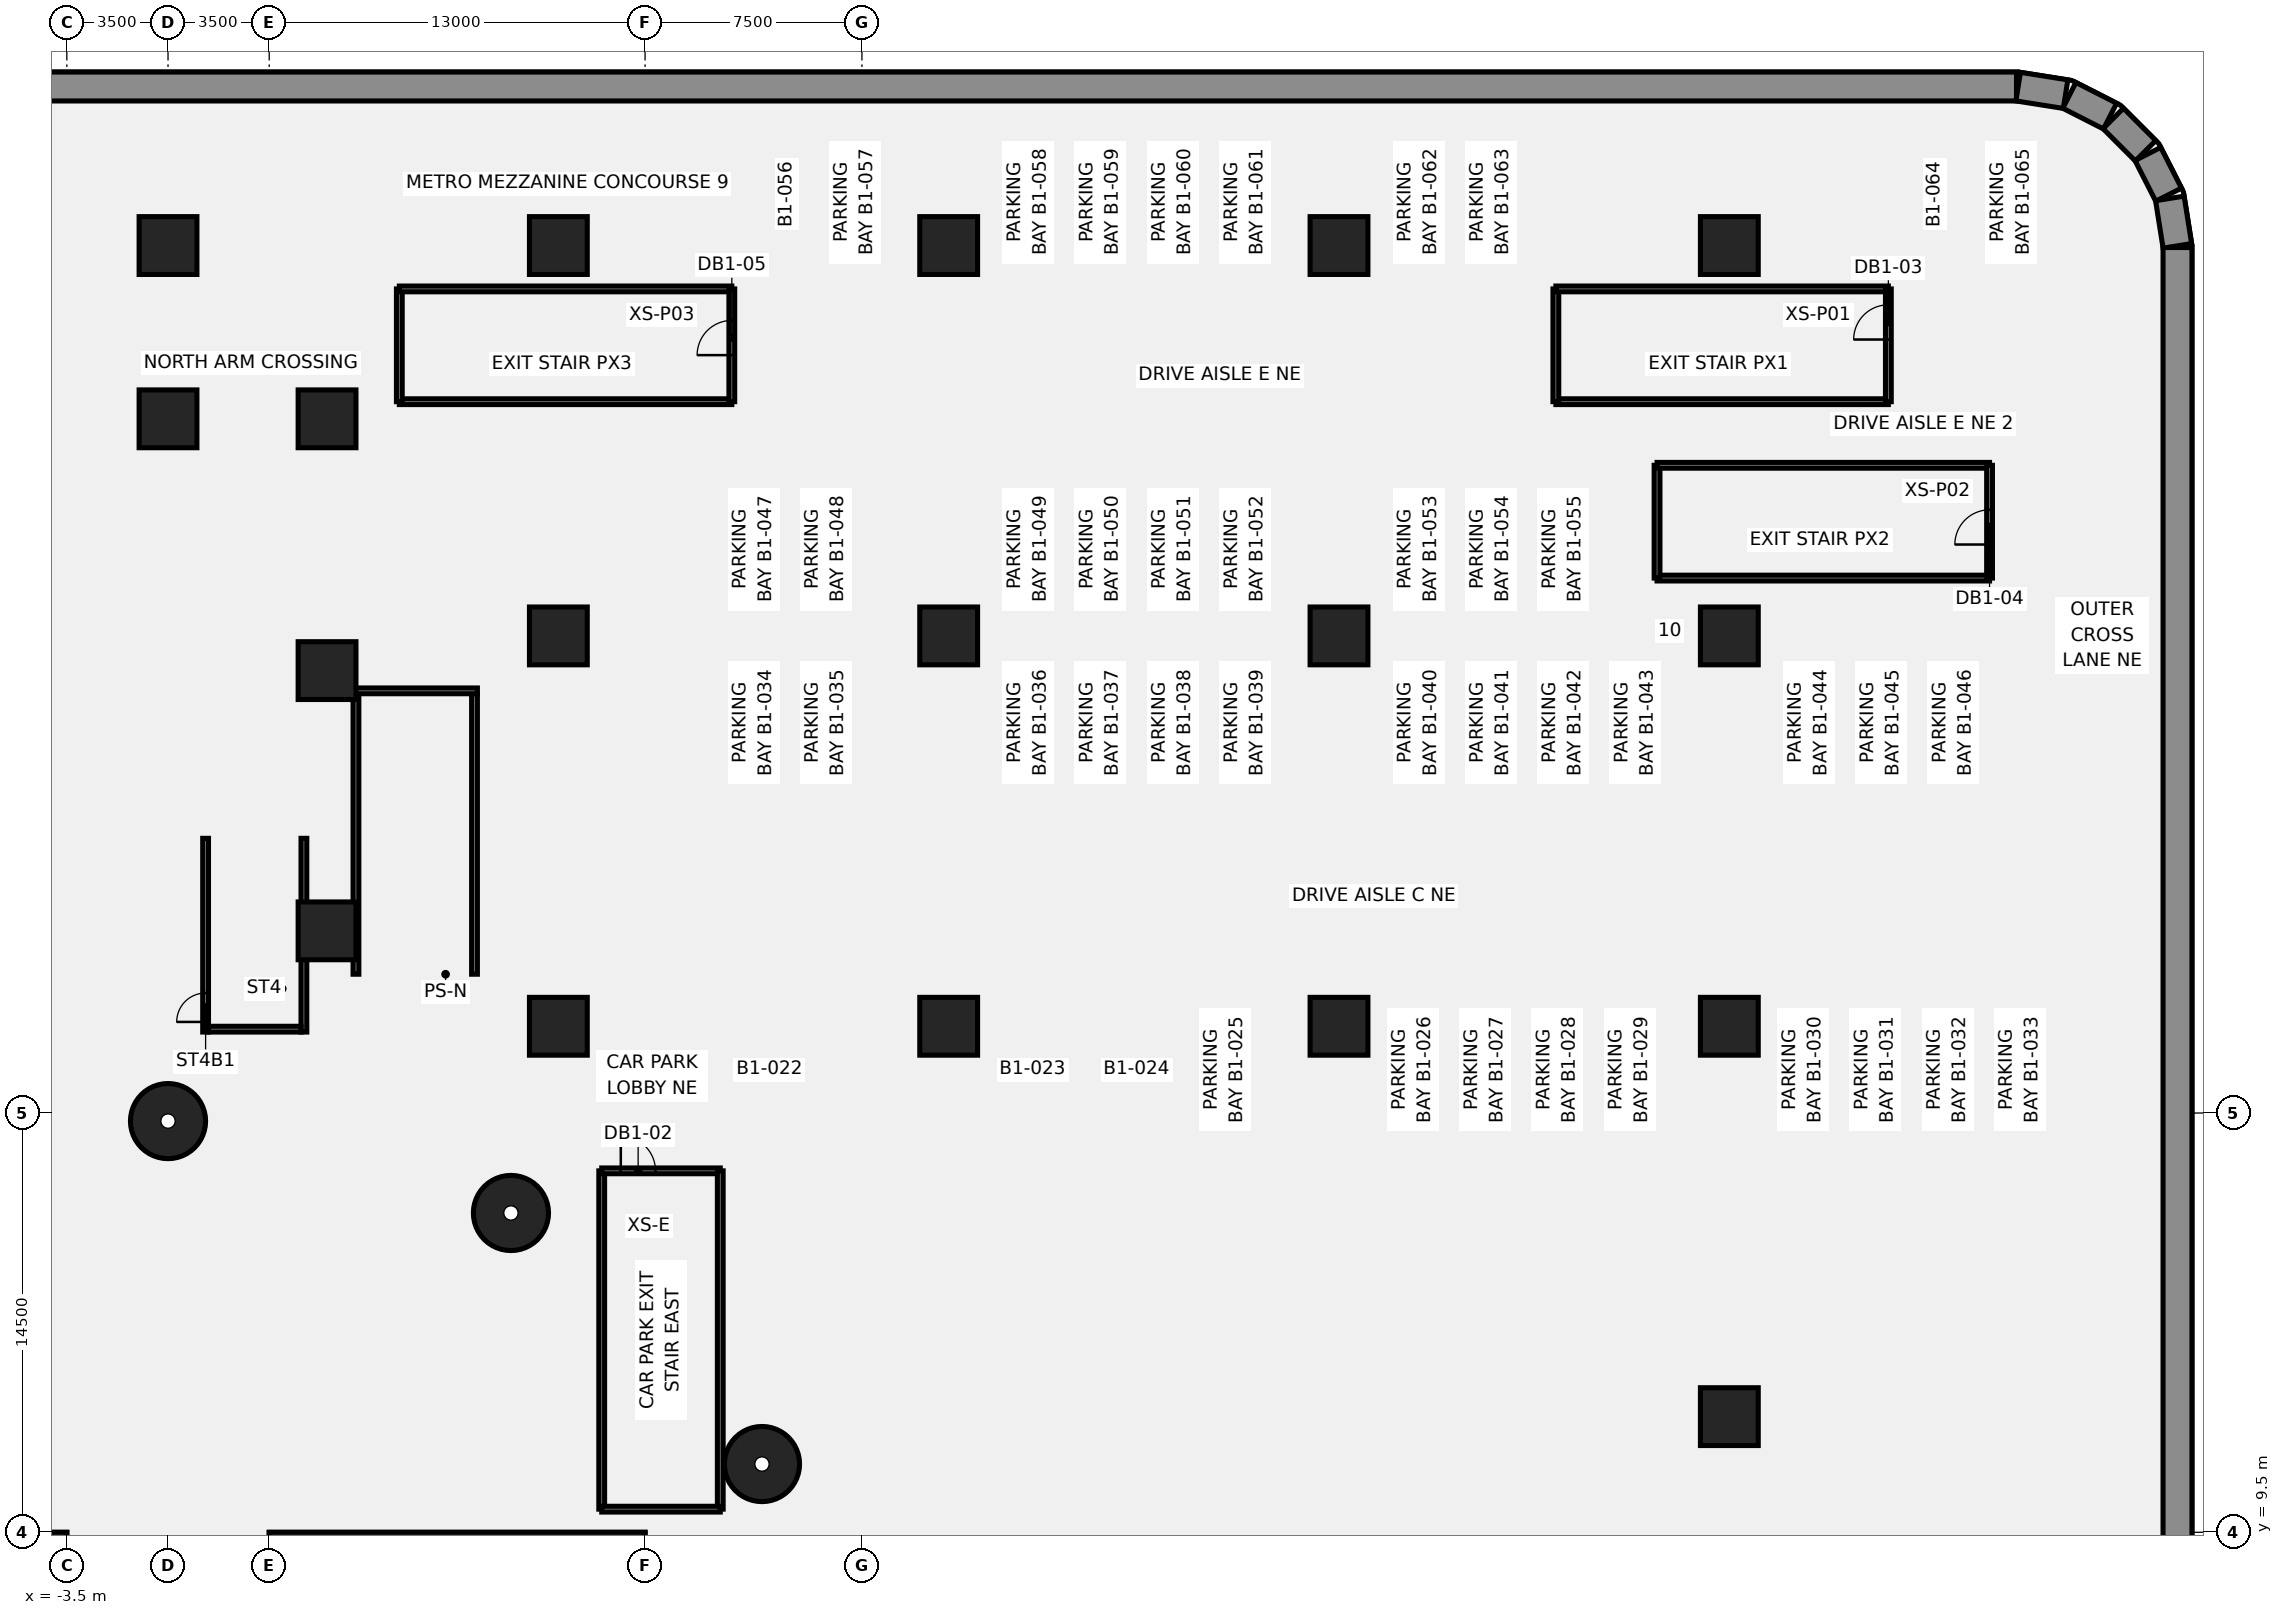
"""IFC4 building model, lengths in metres.
Left out: names, types, materials, properties, quantities, classifications, styles, units other than length and angle.
Written with IfcOpenShell. Run it as: python <this file> out.ifc"""

import sys

from ifc_helpers import new_model, si_unit, direction, frame, frame_2d, origin, origin_2d, place, context, subcontext, project, spatial, polyline, rectangle, circle, outline, extrude, element, fill, save


model = new_model("IFC4")
c1 = context("Model", 3, precision=1e-05, world=origin(), true_north=direction((0.0, 1.0)))
c2 = subcontext(c1, "Body", "Model", "MODEL_VIEW")
j1 = project(units=[si_unit("LENGTHUNIT", "METRE"), si_unit("PLANEANGLEUNIT", "RADIAN")], contexts=[c1])
p1 = place(None, origin())
s1 = spatial("IfcSite", under=j1, at=p1, CompositionType="ELEMENT")
p2 = place(p1, origin())
s2 = spatial("IfcBuilding", under=s1, at=p2, CompositionType="ELEMENT")
p3 = place(p2, frame((0.0, 0.0, -7.0)))
s3 = spatial("IfcBuildingStorey", under=s2, at=p3, CompositionType="ELEMENT", Elevation=-7.0)
p4 = place(p3, frame((-63.931, 59.5, -0.45), z_axis=(0.0, 0.0, 1.0), x_axis=(1.0, 0.0, 0.0)))
e1 = element("IfcWall", 1, at=p4, inside=s3, PredefinedType="SOLIDWALL", context=c2, shape_type="SweptSolid", body=[
    extrude(rectangle(XDim=127.863, YDim=1.0, at=frame_2d((63.931, 0.0))), origin(), (0.0, 0.0, 1.0), 6.9),
])
p5 = place(p3, frame((63.99, 59.495, -0.45), z_axis=(0.0, 0.0, 1.0), x_axis=(0.987688946427, -0.156430639922, 0.0)))
e2 = element("IfcWall", 2, at=p5, inside=s3, PredefinedType="SOLIDWALL", context=c2, shape_type="SweptSolid", body=[
    extrude(rectangle(XDim=1.661, YDim=1.0, at=frame_2d((0.83, 0.0))), origin(), (0.0, 0.0, 1.0), 6.9),
])
for number, where, z_axis, x_axis in (
    (3, (65.759, 59.194, -0.45), (0.0, 0.0, 1.0), (0.891, -0.454, 0.0)),
    (4, (67.278, 58.396, -0.45), (0.0, 0.0, 1.0), (0.707, -0.707, 0.0)),
    (5, (68.476, 57.168, -0.45), (0.0, 0.0, 1.0), (0.454, -0.891, 0.0)),
):
    element("IfcWall", number, at=place(p3, frame(where, z_axis=z_axis, x_axis=x_axis)), inside=s3, PredefinedType="SOLIDWALL", context=c2, shape_type="SweptSolid", body=[
        extrude(rectangle(XDim=1.581, YDim=1.0, at=frame_2d((0.791, 0.0))), origin(), (0.0, 0.0, 1.0), 6.9),
    ])
p6 = place(p3, frame((69.236, 55.63, -0.45), z_axis=(0.0, 0.0, 1.0), x_axis=(0.156430639922, -0.987688946427, 0.0)))
e6 = element("IfcWall", 6, at=p6, inside=s3, PredefinedType="SOLIDWALL", context=c2, shape_type="SweptSolid", body=[
    extrude(rectangle(XDim=1.661, YDim=1.0, at=frame_2d((0.83, 0.0))), origin(), (0.0, 0.0, 1.0), 6.9),
])
p7 = place(p3, frame((69.5, 53.931, -0.45), z_axis=(0.0, 0.0, 1.0), x_axis=(0.0, -1.0, 0.0)))
e7 = element("IfcWall", 7, at=p7, inside=s3, PredefinedType="SOLIDWALL", context=c2, shape_type="SweptSolid", body=[
    extrude(rectangle(XDim=107.863, YDim=1.0, at=frame_2d((53.931, 0.0))), origin(), (0.0, 0.0, 1.0), 6.9),
])
for number, where, z_axis, x_axis in (
    (8, (20.543, 11.86, -0.45), (0.0, 0.0, 1.0), (1.0, 0.0, 0.0)),
    (9, (11.86, 20.543, -0.45), (0.0, 0.0, 1.0), (1.0, 0.0, 0.0)),
    (10, (0.0, 23.721, -0.45), (0.0, 0.0, 1.0), (1.0, 0.0, 0.0)),
):
    element("IfcColumn", number, at=place(p3, frame(where, z_axis=z_axis, x_axis=x_axis)), inside=s3, PredefinedType="COLUMN", context=c2, shape_type="SweptSolid", body=[
        extrude(circle(Radius=1.3, at=origin_2d()), origin(), (0.0, 0.0, 1.0), 6.9),
    ])
for number, where, z_axis, x_axis in (
    (11, (5.5, 39.3, -0.45), (0.0, 0.0, 1.0), (1.0, 0.0, 0.0)),
    (12, (5.5, 30.3, -0.45), (0.0, 0.0, 1.0), (1.0, 0.0, 0.0)),
    (13, (5.5, 48.008, -0.45), (0.0, 0.0, 1.0), (1.0, 0.0, 0.0)),
    (14, (0.0, 48.008, -0.45), (0.0, 0.0, 1.0), (1.0, 0.0, 0.0)),
    (15, (0.0, 54.0, -0.45), (0.0, 0.0, 1.0), (1.0, 0.0, 0.0)),
    (16, (13.5, 27.0, -0.45), (0.0, 0.0, 1.0), (1.0, 0.0, 0.0)),
    (17, (13.5, 40.5, -0.45), (0.0, 0.0, 1.0), (1.0, 0.0, 0.0)),
    (18, (13.5, 54.0, -0.45), (0.0, 0.0, 1.0), (1.0, 0.0, 0.0)),
    (19, (27.0, 27.0, -0.45), (0.0, 0.0, 1.0), (1.0, 0.0, 0.0)),
    (20, (27.0, 40.5, -0.45), (0.0, 0.0, 1.0), (1.0, 0.0, 0.0)),
    (21, (27.0, 54.0, -0.45), (0.0, 0.0, 1.0), (1.0, 0.0, 0.0)),
    (22, (40.5, 27.0, -0.45), (0.0, 0.0, 1.0), (1.0, 0.0, 0.0)),
    (23, (40.5, 40.5, -0.45), (0.0, 0.0, 1.0), (1.0, 0.0, 0.0)),
    (24, (40.5, 54.0, -0.45), (0.0, 0.0, 1.0), (1.0, 0.0, 0.0)),
    (25, (54.0, 13.5, -0.45), (0.0, 0.0, 1.0), (1.0, 0.0, 0.0)),
    (26, (54.0, 27.0, -0.45), (0.0, 0.0, 1.0), (1.0, 0.0, 0.0)),
    (27, (54.0, 40.5, -0.45), (0.0, 0.0, 1.0), (1.0, 0.0, 0.0)),
    (28, (54.0, 54.0, -0.45), (0.0, 0.0, 1.0), (1.0, 0.0, 0.0)),
):
    element("IfcColumn", number, at=place(p3, frame(where, z_axis=z_axis, x_axis=x_axis)), inside=s3, PredefinedType="COLUMN", context=c2, shape_type="SweptSolid", body=[
        extrude(rectangle(XDim=2.0, YDim=2.0, at=origin_2d()), origin(), (0.0, 0.0, 1.0), 6.9),
    ])
p8 = place(p3, frame((15.0, 10.3, 0.0), z_axis=(0.0, 0.0, 1.0), x_axis=(0.0, 1.0, 0.0)))
e29 = element("IfcWall", 29, at=p8, inside=s3, PredefinedType="PARTITIONING", context=c2, shape_type="SweptSolid", body=[
    extrude(rectangle(XDim=11.7, YDim=0.2, at=frame_2d((5.85, 0.0))), origin(), (0.0, 0.0, 1.0), 6.45),
])
p9 = place(p3, frame((15.0, 22.0, 0.0), z_axis=(0.0, 0.0, 1.0), x_axis=(1.0, 0.0, 0.0)))
e30 = element("IfcWall", 30, at=p9, inside=s3, PredefinedType="PARTITIONING", context=c2, shape_type="SweptSolid", body=[
    extrude(rectangle(XDim=4.1, YDim=0.2, at=frame_2d((2.05, 0.0))), origin(), (0.0, 0.0, 1.0), 6.45),
])
p10 = place(p9, frame((0.66, 0.0, 0.0)))
e31 = element("IfcOpeningElement", 31, at=p10, cuts=e30, PredefinedType="OPENING", context=c2, shape_type="SweptSolid", body=[
    extrude(rectangle(XDim=1.2, YDim=2.1, at=frame_2d((0.6, 1.05))), frame((0.0, 0.11, 0.0), z_axis=(0.0, -1.0, 0.0), x_axis=(1.0, 0.0, 0.0)), (0.0, 0.0, 1.0), 0.22),
])
p11 = place(p3, frame((19.1, 10.3, 0.0), z_axis=(0.0, 0.0, 1.0), x_axis=(0.0, 1.0, 0.0)))
e32 = element("IfcWall", 32, at=p11, inside=s3, PredefinedType="PARTITIONING", context=c2, shape_type="SweptSolid", body=[
    extrude(rectangle(XDim=11.7, YDim=0.2, at=frame_2d((5.85, 0.0))), origin(), (0.0, 0.0, 1.0), 6.45),
])
p12 = place(p3, frame((15.0, 10.3, 0.0), z_axis=(0.0, 0.0, 1.0), x_axis=(1.0, 0.0, 0.0)))
e33 = element("IfcWall", 33, at=p12, inside=s3, PredefinedType="PARTITIONING", context=c2, shape_type="SweptSolid", body=[
    extrude(rectangle(XDim=4.1, YDim=0.2, at=frame_2d((2.05, 0.0))), origin(), (0.0, 0.0, 1.0), 6.45),
])
p13 = place(p3, frame((8.0, 48.6, 0.0), z_axis=(0.0, 0.0, 1.0), x_axis=(1.0, 0.0, 0.0)))
e34 = element("IfcWall", 34, at=p13, inside=s3, PredefinedType="PARTITIONING", context=c2, shape_type="SweptSolid", body=[
    extrude(rectangle(XDim=11.5, YDim=0.2, at=frame_2d((5.75, 0.0))), origin(), (0.0, 0.0, 1.0), 6.45),
])
p14 = place(p3, frame((8.0, 48.6, 0.0), z_axis=(0.0, 0.0, 1.0), x_axis=(0.0, 1.0, 0.0)))
e35 = element("IfcWall", 35, at=p14, inside=s3, PredefinedType="PARTITIONING", context=c2, shape_type="SweptSolid", body=[
    extrude(rectangle(XDim=3.9, YDim=0.2, at=frame_2d((1.95, 0.0))), origin(), (0.0, 0.0, 1.0), 6.45),
])
p15 = place(p3, frame((8.0, 52.5, 0.0), z_axis=(0.0, 0.0, 1.0), x_axis=(1.0, 0.0, 0.0)))
e36 = element("IfcWall", 36, at=p15, inside=s3, PredefinedType="PARTITIONING", context=c2, shape_type="SweptSolid", body=[
    extrude(rectangle(XDim=11.5, YDim=0.2, at=frame_2d((5.75, 0.0))), origin(), (0.0, 0.0, 1.0), 6.45),
])
p16 = place(p3, frame((19.5, 48.6, 0.0), z_axis=(0.0, 0.0, 1.0), x_axis=(0.0, 1.0, 0.0)))
e37 = element("IfcWall", 37, at=p16, inside=s3, PredefinedType="PARTITIONING", context=c2, shape_type="SweptSolid", body=[
    extrude(rectangle(XDim=3.9, YDim=0.2, at=frame_2d((1.95, 0.0))), origin(), (0.0, 0.0, 1.0), 6.45),
])
p17 = place(p16, frame((1.61, 0.0, 0.0)))
e38 = element("IfcOpeningElement", 38, at=p17, cuts=e37, PredefinedType="OPENING", context=c2, shape_type="SweptSolid", body=[
    extrude(rectangle(XDim=1.2, YDim=2.1, at=frame_2d((0.6, 1.05))), frame((0.0, 0.11, 0.0), z_axis=(0.0, -1.0, 0.0), x_axis=(1.0, 0.0, 0.0)), (0.0, 0.0, 1.0), 0.22),
])
p18 = place(p3, frame((48.0, 48.6, 0.0), z_axis=(0.0, 0.0, 1.0), x_axis=(1.0, 0.0, 0.0)))
e39 = element("IfcWall", 39, at=p18, inside=s3, PredefinedType="PARTITIONING", context=c2, shape_type="SweptSolid", body=[
    extrude(rectangle(XDim=11.5, YDim=0.2, at=frame_2d((5.75, 0.0))), origin(), (0.0, 0.0, 1.0), 6.45),
])
p19 = place(p3, frame((48.0, 48.6, 0.0), z_axis=(0.0, 0.0, 1.0), x_axis=(0.0, 1.0, 0.0)))
e40 = element("IfcWall", 40, at=p19, inside=s3, PredefinedType="PARTITIONING", context=c2, shape_type="SweptSolid", body=[
    extrude(rectangle(XDim=3.9, YDim=0.2, at=frame_2d((1.95, 0.0))), origin(), (0.0, 0.0, 1.0), 6.45),
])
p20 = place(p3, frame((48.0, 52.5, 0.0), z_axis=(0.0, 0.0, 1.0), x_axis=(1.0, 0.0, 0.0)))
e41 = element("IfcWall", 41, at=p20, inside=s3, PredefinedType="PARTITIONING", context=c2, shape_type="SweptSolid", body=[
    extrude(rectangle(XDim=11.5, YDim=0.2, at=frame_2d((5.75, 0.0))), origin(), (0.0, 0.0, 1.0), 6.45),
])
p21 = place(p3, frame((59.5, 48.6, 0.0), z_axis=(0.0, 0.0, 1.0), x_axis=(0.0, 1.0, 0.0)))
e42 = element("IfcWall", 42, at=p21, inside=s3, PredefinedType="PARTITIONING", context=c2, shape_type="SweptSolid", body=[
    extrude(rectangle(XDim=3.9, YDim=0.2, at=frame_2d((1.95, 0.0))), origin(), (0.0, 0.0, 1.0), 6.45),
])
p22 = place(p21, frame((2.15, 0.0, 0.0)))
e43 = element("IfcOpeningElement", 43, at=p22, cuts=e42, PredefinedType="OPENING", context=c2, shape_type="SweptSolid", body=[
    extrude(rectangle(XDim=1.2, YDim=2.1, at=frame_2d((0.6, 1.05))), frame((0.0, 0.11, 0.0), z_axis=(0.0, -1.0, 0.0), x_axis=(1.0, 0.0, 0.0)), (0.0, 0.0, 1.0), 0.22),
])
p23 = place(p3, frame((51.5, 42.5, 0.0), z_axis=(0.0, 0.0, 1.0), x_axis=(1.0, 0.0, 0.0)))
e44 = element("IfcWall", 44, at=p23, inside=s3, PredefinedType="PARTITIONING", context=c2, shape_type="SweptSolid", body=[
    extrude(rectangle(XDim=11.5, YDim=0.2, at=frame_2d((5.75, 0.0))), origin(), (0.0, 0.0, 1.0), 6.45),
])
p24 = place(p3, frame((51.5, 42.5, 0.0), z_axis=(0.0, 0.0, 1.0), x_axis=(0.0, 1.0, 0.0)))
e45 = element("IfcWall", 45, at=p24, inside=s3, PredefinedType="PARTITIONING", context=c2, shape_type="SweptSolid", body=[
    extrude(rectangle(XDim=3.9, YDim=0.2, at=frame_2d((1.95, 0.0))), origin(), (0.0, 0.0, 1.0), 6.45),
])
p25 = place(p3, frame((51.5, 46.4, 0.0), z_axis=(0.0, 0.0, 1.0), x_axis=(1.0, 0.0, 0.0)))
e46 = element("IfcWall", 46, at=p25, inside=s3, PredefinedType="PARTITIONING", context=c2, shape_type="SweptSolid", body=[
    extrude(rectangle(XDim=11.5, YDim=0.2, at=frame_2d((5.75, 0.0))), origin(), (0.0, 0.0, 1.0), 6.45),
])
p26 = place(p3, frame((63.0, 42.5, 0.0), z_axis=(0.0, 0.0, 1.0), x_axis=(0.0, 1.0, 0.0)))
e47 = element("IfcWall", 47, at=p26, inside=s3, PredefinedType="PARTITIONING", context=c2, shape_type="SweptSolid", body=[
    extrude(rectangle(XDim=3.9, YDim=0.2, at=frame_2d((1.95, 0.0))), origin(), (0.0, 0.0, 1.0), 6.45),
])
p27 = place(p26, frame((1.16, 0.0, 0.0)))
e48 = element("IfcOpeningElement", 48, at=p27, cuts=e47, PredefinedType="OPENING", context=c2, shape_type="SweptSolid", body=[
    extrude(rectangle(XDim=1.2, YDim=2.1, at=frame_2d((0.6, 1.05))), frame((0.0, 0.11, 0.0), z_axis=(0.0, -1.0, 0.0), x_axis=(1.0, 0.0, 0.0)), (0.0, 0.0, 1.0), 0.22),
])
for number, where, z_axis, x_axis in (
    (49, (10.6, 28.8, 0.0), (0.0, 0.0, 1.0), (0.0, 1.0, 0.0)),
    (50, (6.5, 28.8, 0.0), (0.0, 0.0, 1.0), (0.0, 1.0, 0.0)),
):
    element("IfcWall", number, at=place(p3, frame(where, z_axis=z_axis, x_axis=x_axis)), inside=s3, PredefinedType="SOLIDWALL", context=c2, shape_type="SweptSolid", body=[
        extrude(rectangle(XDim=9.7, YDim=0.2, at=frame_2d((4.85, 0.0))), origin(), (0.0, 0.0, 1.0), 6.45),
    ])
p28 = place(p3, frame((10.7, 38.6, 0.0), z_axis=(0.0, 0.0, 1.0), x_axis=(-1.0, 0.0, 0.0)))
e51 = element("IfcWall", 51, at=p28, inside=s3, PredefinedType="SOLIDWALL", context=c2, shape_type="SweptSolid", body=[
    extrude(rectangle(XDim=4.3, YDim=0.2, at=frame_2d((2.15, 0.0))), origin(), (0.0, 0.0, 1.0), 6.45),
])
for number, where, z_axis, x_axis in (
    (52, (-16.5, 9.15, 0.0), (0.0, 0.0, 1.0), (1.0, 0.0, 0.0)),
    (53, (16.5, 9.15, 0.0), (0.0, 0.0, 1.0), (-1.0, 0.0, 0.0)),
):
    element("IfcWall", number, at=place(p3, frame(where, z_axis=z_axis, x_axis=x_axis)), inside=s3, PredefinedType="SHEAR", context=c2, shape_type="SweptSolid", body=[
        extrude(rectangle(XDim=13.0, YDim=0.7, at=frame_2d((6.5, 0.0))), origin(), (0.0, 0.0, 1.0), 6.45),
    ])
p29 = place(p3, frame((1.3, 26.8, 0.0), z_axis=(0.0, 0.0, 1.0), x_axis=(0.0, 1.0, 0.0)))
e54 = element("IfcWall", 54, at=p29, inside=s3, PredefinedType="SHEAR", context=c2, shape_type="SweptSolid", body=[
    extrude(rectangle(XDim=6.7, YDim=0.2, at=frame_2d((3.35, 0.0))), origin(), (0.0, 0.0, 1.0), 6.45),
])
p30 = place(p29, frame((0.35, 0.0, 0.0)))
e55 = element("IfcOpeningElement", 55, at=p30, cuts=e54, PredefinedType="OPENING", context=c2, shape_type="SweptSolid", body=[
    extrude(rectangle(XDim=1.0, YDim=2.1, at=frame_2d((0.5, 1.05))), frame((0.0, 0.11, 0.0), z_axis=(0.0, -1.0, 0.0), x_axis=(1.0, 0.0, 0.0)), (0.0, 0.0, 1.0), 0.22),
])
p31 = place(p3, frame((4.7, 26.8, 0.0), z_axis=(0.0, 0.0, 1.0), x_axis=(0.0, 1.0, 0.0)))
e56 = element("IfcWall", 56, at=p31, inside=s3, PredefinedType="SHEAR", context=c2, shape_type="SweptSolid", body=[
    extrude(rectangle(XDim=6.7, YDim=0.2, at=frame_2d((3.35, 0.0))), origin(), (0.0, 0.0, 1.0), 6.45),
])
p32 = place(p3, frame((4.6, 26.9, 0.0), z_axis=(0.0, 0.0, 1.0), x_axis=(-1.0, 0.0, 0.0)))
e57 = element("IfcWall", 57, at=p32, inside=s3, PredefinedType="SHEAR", context=c2, shape_type="SweptSolid", body=[
    extrude(rectangle(XDim=3.2, YDim=0.2, at=frame_2d((1.6, 0.0))), origin(), (0.0, 0.0, 1.0), 6.45),
])
p33 = place(p3, origin())
e58 = element("IfcWall", 58, at=p33, inside=s3, PredefinedType="SHEAR", context=c2, shape_type="SweptSolid", body=[
    extrude(outline(polyline([(4.6, 33.3), (4.6, 33.5), (1.4, 33.5), (1.4, 33.3), (4.6, 33.3)])), origin(), (0.0, 0.0, 1.0), 6.45),
])
p34 = place(p10, origin())
e59 = element("IfcDoor", 59, at=p34, inside=s3, OperationType="SINGLE_SWING_RIGHT", PredefinedType="DOOR", context=c2, shape_type="SweptSolid", body=[
    extrude(rectangle(XDim=1.2, YDim=2.1, at=frame_2d((0.6, 1.05))), frame((0.0, 0.025, 0.0), z_axis=(0.0, -1.0, 0.0), x_axis=(1.0, 0.0, 0.0)), (0.0, 0.0, 1.0), 0.05),
])
fill(e31, e59)
p35 = place(p22, origin())
e60 = element("IfcDoor", 60, at=p35, inside=s3, OperationType="SINGLE_SWING_LEFT", PredefinedType="DOOR", context=c2, shape_type="SweptSolid", body=[
    extrude(rectangle(XDim=1.2, YDim=2.1, at=frame_2d((0.6, 1.05))), frame((0.0, 0.025, 0.0), z_axis=(0.0, -1.0, 0.0), x_axis=(1.0, 0.0, 0.0)), (0.0, 0.0, 1.0), 0.05),
])
fill(e43, e60)
p36 = place(p27, origin())
e61 = element("IfcDoor", 61, at=p36, inside=s3, OperationType="SINGLE_SWING_RIGHT", PredefinedType="DOOR", context=c2, shape_type="SweptSolid", body=[
    extrude(rectangle(XDim=1.2, YDim=2.1, at=frame_2d((0.6, 1.05))), frame((0.0, 0.025, 0.0), z_axis=(0.0, -1.0, 0.0), x_axis=(1.0, 0.0, 0.0)), (0.0, 0.0, 1.0), 0.05),
])
fill(e48, e61)
p37 = place(p17, origin())
e62 = element("IfcDoor", 62, at=p37, inside=s3, OperationType="SINGLE_SWING_LEFT", PredefinedType="DOOR", context=c2, shape_type="SweptSolid", body=[
    extrude(rectangle(XDim=1.2, YDim=2.1, at=frame_2d((0.6, 1.05))), frame((0.0, 0.025, 0.0), z_axis=(0.0, -1.0, 0.0), x_axis=(1.0, 0.0, 0.0)), (0.0, 0.0, 1.0), 0.05),
])
fill(e38, e62)
p38 = place(p30, origin())
e63 = element("IfcDoor", 63, at=p38, inside=s3, OperationType="SINGLE_SWING_LEFT", PredefinedType="DOOR", context=c2, shape_type="SweptSolid", body=[
    extrude(rectangle(XDim=1.0, YDim=2.1, at=frame_2d((0.5, 1.05))), frame((0.0, 0.025, 0.0), z_axis=(0.0, -1.0, 0.0), x_axis=(1.0, 0.0, 0.0)), (0.0, 0.0, 1.0), 0.05),
])
fill(e55, e63)
save(model, sys.argv[1])
